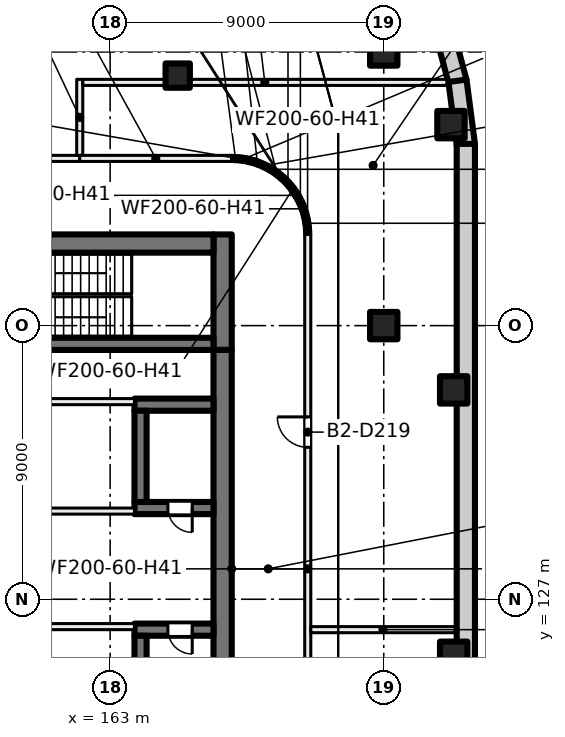
"""IFC4 building model, lengths in metres.
Left out: names, types, materials, properties, quantities, classifications, styles, units other than length and angle.
Written with IfcOpenShell. Run it as: python <this file> out.ifc"""

import sys

from ifc_helpers import new_model, si_unit, direction, frame, frame_2d, origin, origin_2d, place, context, subcontext, project, spatial, rectangle, extrude, element, fill, save


model = new_model("IFC4")
c1 = context("Model", 3, precision=1e-05, world=origin(), true_north=direction((0.0, 1.0)))
c2 = subcontext(c1, "Body", "Model", "MODEL_VIEW")
j1 = project(units=[si_unit("LENGTHUNIT", "METRE"), si_unit("PLANEANGLEUNIT", "RADIAN")], contexts=[c1])
p1 = place(None, origin())
s1 = spatial("IfcSite", under=j1, at=p1, CompositionType="ELEMENT")
p2 = place(p1, origin())
s2 = spatial("IfcBuilding", under=s1, at=p2, CompositionType="ELEMENT")
p3 = place(p2, frame((0.0, 0.0, -9.0)))
s3 = spatial("IfcBuildingStorey", under=s2, at=p3, CompositionType="ELEMENT", Elevation=-9.0)
p4 = place(p3, frame((173.908, 145.968, 0.0), z_axis=(0.0, 0.0, 1.0), x_axis=(0.258804467146, -0.965929732323, 0.0)))
e1 = element("IfcWall", 1, at=p4, inside=s3, PredefinedType="SHEAR", context=c2, shape_type="SweptSolid", body=[
    extrude(rectangle(XDim=2.022, YDim=0.6, at=frame_2d((1.011, 0.0))), origin(), (0.0, 0.0, 1.0), 4.5),
])
p5 = place(p3, frame((174.424, 144.052, 0.0), z_axis=(0.0, 0.0, 1.0), x_axis=(0.130558200013, -0.991440646942, 0.0)))
e2 = element("IfcWall", 2, at=p5, inside=s3, PredefinedType="SHEAR", context=c2, shape_type="SweptSolid", body=[
    extrude(rectangle(XDim=2.132, YDim=0.6, at=frame_2d((1.066, 0.0))), origin(), (0.0, 0.0, 1.0), 4.5),
])
p6 = place(p3, frame((174.7, 141.978, 0.0), z_axis=(0.0, 0.0, 1.0), x_axis=(0.0, -1.0, 0.0)))
e3 = element("IfcWall", 3, at=p6, inside=s3, PredefinedType="SHEAR", context=c2, shape_type="SweptSolid", body=[
    extrude(rectangle(XDim=27.957, YDim=0.6, at=frame_2d((13.978, 0.0))), origin(), (0.0, 0.0, 1.0), 4.5),
])
for number, where, z_axis, x_axis in (
    (4, (172.0, 136.0, 0.0), (0.0, 0.0, 1.0), (1.0, 0.0, 0.0)),
    (5, (172.0, 145.0, 0.0), (0.0, 0.0, 1.0), (1.0, 0.0, 0.0)),
    (6, (174.211, 142.611, 0.0), (0.0, 0.0, 1.0), (1.0, 0.0, 0.0)),
    (7, (174.3, 133.887, 0.0), (0.0, 0.0, 1.0), (1.0, 0.0, 0.0)),
    (8, (174.3, 125.157, 0.0), (0.0, 0.0, 1.0), (1.0, 0.0, 0.0)),
):
    element("IfcColumn", number, at=place(p3, frame(where, z_axis=z_axis, x_axis=x_axis)), inside=s3, PredefinedType="COLUMN", context=c2, shape_type="SweptSolid", body=[
        extrude(rectangle(XDim=0.9, YDim=0.9, at=origin_2d()), origin(), (0.0, 0.0, 1.0), 4.5),
    ])
p7 = place(p3, frame((165.223, 144.223, 0.0), z_axis=(0.0, 0.0, 1.0), x_axis=(1.0, 0.0, 0.0)))
e9 = element("IfcColumn", 9, at=p7, inside=s3, PredefinedType="COLUMN", context=c2, shape_type="SweptSolid", body=[
    extrude(rectangle(XDim=0.8, YDim=0.8, at=origin_2d()), origin(), (0.0, 0.0, 1.0), 4.5),
])
p8 = place(p3, frame((166.7, 139.0, 0.0), z_axis=(0.0, 0.0, 1.0), x_axis=(0.0, -1.0, 0.0)))
e10 = element("IfcWall", 10, at=p8, inside=s3, PredefinedType="SHEAR", context=c2, shape_type="SweptSolid", body=[
    extrude(rectangle(XDim=3.8, YDim=0.6, at=frame_2d((1.9, 0.0))), origin(), (0.0, 0.0, 1.0), 4.5),
])
p9 = place(p3, frame((166.7, 135.2, 0.0), z_axis=(0.0, 0.0, 1.0), x_axis=(0.0, -1.0, 0.0)))
e11 = element("IfcWall", 11, at=p9, inside=s3, PredefinedType="SHEAR", context=c2, shape_type="SweptSolid", body=[
    extrude(rectangle(XDim=14.4, YDim=0.6, at=frame_2d((7.2, 0.0))), origin(), (0.0, 0.0, 1.0), 4.5),
])
p10 = place(p3, frame((166.4, 138.7, 0.0), z_axis=(0.0, 0.0, 1.0), x_axis=(-1.0, 0.0, 0.0)))
e12 = element("IfcWall", 12, at=p10, inside=s3, PredefinedType="SHEAR", context=c2, shape_type="SweptSolid", body=[
    extrude(rectangle(XDim=7.8, YDim=0.6, at=frame_2d((3.9, 0.0))), origin(), (0.0, 0.0, 1.0), 4.5),
])
p11 = place(p3, frame((166.4, 135.4, 0.0), z_axis=(0.0, 0.0, 1.0), x_axis=(-1.0, 0.0, 0.0)))
e13 = element("IfcWall", 13, at=p11, inside=s3, PredefinedType="SHEAR", context=c2, shape_type="SweptSolid", body=[
    extrude(rectangle(XDim=7.8, YDim=0.4, at=frame_2d((3.9, 0.0))), origin(), (0.0, 0.0, 1.0), 4.5),
])
p12 = place(p3, frame((166.4, 130.0, 0.0), z_axis=(0.0, 0.0, 1.0), x_axis=(-1.0, 0.0, 0.0)))
e14 = element("IfcWall", 14, at=p12, inside=s3, PredefinedType="SHEAR", context=c2, shape_type="SweptSolid", body=[
    extrude(rectangle(XDim=2.6, YDim=0.4, at=frame_2d((1.3, 0.0))), origin(), (0.0, 0.0, 1.0), 4.5),
])
p13 = place(p12, frame((0.7, 0.0, 0.0)))
e15 = element("IfcOpeningElement", 15, at=p13, cuts=e14, PredefinedType="OPENING", context=c2, shape_type="SweptSolid", body=[
    extrude(rectangle(XDim=0.8, YDim=2.1, at=frame_2d((0.4, 1.05))), frame((0.0, 0.21, 0.0), z_axis=(0.0, -1.0, 0.0), x_axis=(1.0, 0.0, 0.0)), (0.0, 0.0, 1.0), 0.42),
])
p14 = place(p3, frame((166.4, 133.4, 0.0), z_axis=(0.0, 0.0, 1.0), x_axis=(-1.0, 0.0, 0.0)))
e16 = element("IfcWall", 16, at=p14, inside=s3, PredefinedType="SHEAR", context=c2, shape_type="SweptSolid", body=[
    extrude(rectangle(XDim=2.6, YDim=0.4, at=frame_2d((1.3, 0.0))), origin(), (0.0, 0.0, 1.0), 4.5),
])
p15 = place(p3, frame((164.0, 133.2, 0.0), z_axis=(0.0, 0.0, 1.0), x_axis=(0.0, -1.0, 0.0)))
e17 = element("IfcWall", 17, at=p15, inside=s3, PredefinedType="SHEAR", context=c2, shape_type="SweptSolid", body=[
    extrude(rectangle(XDim=3.0, YDim=0.4, at=frame_2d((1.5, 0.0))), origin(), (0.0, 0.0, 1.0), 4.5),
])
p16 = place(p3, frame((166.4, 126.0, 0.0), z_axis=(0.0, 0.0, 1.0), x_axis=(-1.0, 0.0, 0.0)))
e18 = element("IfcWall", 18, at=p16, inside=s3, PredefinedType="SHEAR", context=c2, shape_type="SweptSolid", body=[
    extrude(rectangle(XDim=2.6, YDim=0.4, at=frame_2d((1.3, 0.0))), origin(), (0.0, 0.0, 1.0), 4.5),
])
p17 = place(p16, frame((0.7, 0.0, 0.0)))
e19 = element("IfcOpeningElement", 19, at=p17, cuts=e18, PredefinedType="OPENING", context=c2, shape_type="SweptSolid", body=[
    extrude(rectangle(XDim=0.8, YDim=2.1, at=frame_2d((0.4, 1.05))), frame((0.0, 0.21, 0.0), z_axis=(0.0, -1.0, 0.0), x_axis=(1.0, 0.0, 0.0)), (0.0, 0.0, 1.0), 0.42),
])
p18 = place(p3, frame((164.0, 125.8, 0.0), z_axis=(0.0, 0.0, 1.0), x_axis=(0.0, -1.0, 0.0)))
e20 = element("IfcWall", 20, at=p18, inside=s3, PredefinedType="SHEAR", context=c2, shape_type="SweptSolid", body=[
    extrude(rectangle(XDim=3.0, YDim=0.4, at=frame_2d((1.5, 0.0))), origin(), (0.0, 0.0, 1.0), 4.5),
])
p19 = place(p3, frame((163.8, 126.1, 0.0), z_axis=(0.0, 0.0, 1.0), x_axis=(-1.0, 0.0, 0.0)))
e21 = element("IfcWall", 21, at=p19, inside=s3, PredefinedType="PARTITIONING", context=c2, shape_type="SweptSolid", body=[
    extrude(rectangle(XDim=9.4, YDim=0.2, at=frame_2d((4.7, 0.0))), origin(), (0.0, 0.0, 1.0), 4.125),
])
p20 = place(p19, frame((4.1, 0.0, 0.0)))
e22 = element("IfcOpeningElement", 22, at=p20, cuts=e21, PredefinedType="OPENING", context=c2, shape_type="SweptSolid", body=[
    extrude(rectangle(XDim=1.2, YDim=2.1, at=frame_2d((0.6, 1.05))), frame((0.0, 0.11, 0.0), z_axis=(0.0, -1.0, 0.0), x_axis=(1.0, 0.0, 0.0)), (0.0, 0.0, 1.0), 0.22),
])
p21 = place(p3, frame((154.4, 129.9, 0.0), z_axis=(0.0, 0.0, 1.0), x_axis=(1.0, 0.0, 0.0)))
e23 = element("IfcWall", 23, at=p21, inside=s3, PredefinedType="PARTITIONING", context=c2, shape_type="SweptSolid", body=[
    extrude(rectangle(XDim=9.4, YDim=0.2, at=frame_2d((4.7, 0.0))), origin(), (0.0, 0.0, 1.0), 4.125),
])
p22 = place(p21, frame((4.1, 0.0, 0.0)))
e24 = element("IfcOpeningElement", 24, at=p22, cuts=e23, PredefinedType="OPENING", context=c2, shape_type="SweptSolid", body=[
    extrude(rectangle(XDim=1.2, YDim=2.1, at=frame_2d((0.6, 1.05))), frame((0.0, 0.11, 0.0), z_axis=(0.0, -1.0, 0.0), x_axis=(1.0, 0.0, 0.0)), (0.0, 0.0, 1.0), 0.22),
])
p23 = place(p3, frame((154.4, 133.5, 0.0), z_axis=(0.0, 0.0, 1.0), x_axis=(1.0, 0.0, 0.0)))
e25 = element("IfcWall", 25, at=p23, inside=s3, PredefinedType="PARTITIONING", context=c2, shape_type="SweptSolid", body=[
    extrude(rectangle(XDim=9.4, YDim=0.2, at=frame_2d((4.7, 0.0))), origin(), (0.0, 0.0, 1.0), 4.125),
])
p24 = place(p23, frame((1.35, 0.0, 0.0)))
e26 = element("IfcOpeningElement", 26, at=p24, cuts=e25, PredefinedType="OPENING", context=c2, shape_type="SweptSolid", body=[
    extrude(rectangle(XDim=1.5, YDim=2.1, at=frame_2d((0.75, 1.05))), frame((0.0, 0.11, 0.0), z_axis=(0.0, -1.0, 0.0), x_axis=(1.0, 0.0, 0.0)), (0.0, 0.0, 1.0), 0.22),
])
p25 = place(p3, frame((154.1, 141.5, 0.0), z_axis=(0.0, 0.0, 1.0), x_axis=(1.0, 0.0, 0.0)))
e27 = element("IfcWall", 27, at=p25, inside=s3, PredefinedType="PARTITIONING", context=c2, shape_type="SweptSolid", body=[
    extrude(rectangle(XDim=7.9, YDim=0.2, at=frame_2d((3.95, 0.0))), origin(), (0.0, 0.0, 1.0), 4.125),
])
p26 = place(p3, frame((162.0, 141.6, 0.0), z_axis=(0.0, 0.0, 1.0), x_axis=(0.0, 1.0, 0.0)))
e28 = element("IfcWall", 28, at=p26, inside=s3, PredefinedType="PARTITIONING", context=c2, shape_type="SweptSolid", body=[
    extrude(rectangle(XDim=2.5, YDim=0.2, at=frame_2d((1.25, 0.0))), origin(), (0.0, 0.0, 1.0), 4.125),
])
p27 = place(p3, frame((162.0, 141.5, 0.0), z_axis=(0.0, 0.0, 1.0), x_axis=(1.0, 0.0, 0.0)))
e29 = element("IfcWall", 29, at=p27, inside=s3, PredefinedType="PARTITIONING", context=c2, shape_type="SweptSolid", body=[
    extrude(rectangle(XDim=5.002, YDim=0.2, at=frame_2d((2.501, 0.0))), origin(), (0.0, 0.0, 1.0), 4.125),
])
p28 = place(p3, frame((162.1, 144.0, 0.0), z_axis=(0.0, 0.0, 1.0), x_axis=(1.0, 0.0, 0.0)))
e30 = element("IfcWall", 30, at=p28, inside=s3, PredefinedType="PARTITIONING", context=c2, shape_type="SweptSolid", body=[
    extrude(rectangle(XDim=11.974, YDim=0.2, at=frame_2d((5.987, 0.0))), origin(), (0.0, 0.0, 1.0), 4.125),
])
p29 = place(p3, frame((166.998, 141.5, 0.0), z_axis=(0.0, 0.0, 1.0), x_axis=(0.998874697667, -0.047427190102, 0.0)))
e31 = element("IfcWall", 31, at=p29, inside=s3, PredefinedType="PARTITIONING", context=c2, shape_type="SweptSolid", body=[
    extrude(rectangle(XDim=0.252, YDim=0.2, at=frame_2d((0.126, 0.0))), origin(), (0.0, 0.0, 1.0), 4.125),
])
p30 = place(p3, frame((167.24, 141.489, 0.0), z_axis=(0.0, 0.0, 1.0), x_axis=(0.988852180426, -0.148900521377, 0.0)))
e32 = element("IfcWall", 32, at=p30, inside=s3, PredefinedType="PARTITIONING", context=c2, shape_type="SweptSolid", body=[
    extrude(rectangle(XDim=0.256, YDim=0.2, at=frame_2d((0.128, 0.0))), origin(), (0.0, 0.0, 1.0), 4.125),
])
p31 = place(p3, frame((167.483, 141.453, 0.0), z_axis=(0.0, 0.0, 1.0), x_axis=(0.970366809683, -0.241636616978, 0.0)))
e33 = element("IfcWall", 33, at=p31, inside=s3, PredefinedType="PARTITIONING", context=c2, shape_type="SweptSolid", body=[
    extrude(rectangle(XDim=0.256, YDim=0.2, at=frame_2d((0.128, 0.0))), origin(), (0.0, 0.0, 1.0), 4.125),
])
p32 = place(p3, frame((167.722, 141.394, 0.0), z_axis=(0.0, 0.0, 1.0), x_axis=(0.941459892631, -0.337125007331, 0.0)))
e34 = element("IfcWall", 34, at=p32, inside=s3, PredefinedType="PARTITIONING", context=c2, shape_type="SweptSolid", body=[
    extrude(rectangle(XDim=0.255, YDim=0.2, at=frame_2d((0.127, 0.0))), origin(), (0.0, 0.0, 1.0), 4.125),
])
p33 = place(p3, frame((167.952, 141.312, 0.0), z_axis=(0.0, 0.0, 1.0), x_axis=(0.903444698448, -0.4287046499, 0.0)))
e35 = element("IfcWall", 35, at=p33, inside=s3, PredefinedType="PARTITIONING", context=c2, shape_type="SweptSolid", body=[
    extrude(rectangle(XDim=0.255, YDim=0.2, at=frame_2d((0.127, 0.0))), origin(), (0.0, 0.0, 1.0), 4.125),
])
p34 = place(p3, frame((168.174, 141.207, 0.0), z_axis=(0.0, 0.0, 1.0), x_axis=(0.857998903579, -0.513651517527, 0.0)))
e36 = element("IfcWall", 36, at=p34, inside=s3, PredefinedType="PARTITIONING", context=c2, shape_type="SweptSolid", body=[
    extrude(rectangle(XDim=0.255, YDim=0.2, at=frame_2d((0.127, 0.0))), origin(), (0.0, 0.0, 1.0), 4.125),
])
p35 = place(p3, frame((168.385, 141.082, 0.0), z_axis=(0.0, 0.0, 1.0), x_axis=(0.803201336243, -0.595707657713, 0.0)))
e37 = element("IfcWall", 37, at=p35, inside=s3, PredefinedType="PARTITIONING", context=c2, shape_type="SweptSolid", body=[
    extrude(rectangle(XDim=0.255, YDim=0.2, at=frame_2d((0.128, 0.0))), origin(), (0.0, 0.0, 1.0), 4.125),
])
for number, where, z_axis, x_axis in (
    (38, (168.582, 140.936, 0.0), (0.0, 0.0, 1.0), (0.743, -0.669, 0.0)),
    (39, (168.765, 140.772, 0.0), (0.0, 0.0, 1.0), (0.669, -0.743, 0.0)),
):
    element("IfcWall", number, at=place(p3, frame(where, z_axis=z_axis, x_axis=x_axis)), inside=s3, PredefinedType="PARTITIONING", context=c2, shape_type="SweptSolid", body=[
        extrude(rectangle(XDim=0.256, YDim=0.2, at=frame_2d((0.128, 0.0))), origin(), (0.0, 0.0, 1.0), 4.125),
    ])
p36 = place(p3, frame((168.93, 140.59, 0.0), z_axis=(0.0, 0.0, 1.0), x_axis=(0.595707657713, -0.803201336243, 0.0)))
e40 = element("IfcWall", 40, at=p36, inside=s3, PredefinedType="PARTITIONING", context=c2, shape_type="SweptSolid", body=[
    extrude(rectangle(XDim=0.255, YDim=0.2, at=frame_2d((0.128, 0.0))), origin(), (0.0, 0.0, 1.0), 4.125),
])
p37 = place(p3, frame((169.076, 140.393, 0.0), z_axis=(0.0, 0.0, 1.0), x_axis=(0.513651517527, -0.857998903579, 0.0)))
e41 = element("IfcWall", 41, at=p37, inside=s3, PredefinedType="PARTITIONING", context=c2, shape_type="SweptSolid", body=[
    extrude(rectangle(XDim=0.255, YDim=0.2, at=frame_2d((0.127, 0.0))), origin(), (0.0, 0.0, 1.0), 4.125),
])
p38 = place(p3, frame((169.203, 140.182, 0.0), z_axis=(0.0, 0.0, 1.0), x_axis=(0.4287046499, -0.903444698448, 0.0)))
e42 = element("IfcWall", 42, at=p38, inside=s3, PredefinedType="PARTITIONING", context=c2, shape_type="SweptSolid", body=[
    extrude(rectangle(XDim=0.255, YDim=0.2, at=frame_2d((0.127, 0.0))), origin(), (0.0, 0.0, 1.0), 4.125),
])
p39 = place(p3, frame((169.308, 139.962, 0.0), z_axis=(0.0, 0.0, 1.0), x_axis=(0.337125007331, -0.941459892631, 0.0)))
e43 = element("IfcWall", 43, at=p39, inside=s3, PredefinedType="PARTITIONING", context=c2, shape_type="SweptSolid", body=[
    extrude(rectangle(XDim=0.255, YDim=0.2, at=frame_2d((0.127, 0.0))), origin(), (0.0, 0.0, 1.0), 4.125),
])
p40 = place(p3, frame((169.391, 139.731, 0.0), z_axis=(0.0, 0.0, 1.0), x_axis=(0.241636616978, -0.970366809683, 0.0)))
e44 = element("IfcWall", 44, at=p40, inside=s3, PredefinedType="PARTITIONING", context=c2, shape_type="SweptSolid", body=[
    extrude(rectangle(XDim=0.256, YDim=0.2, at=frame_2d((0.128, 0.0))), origin(), (0.0, 0.0, 1.0), 4.125),
])
p41 = place(p3, frame((169.451, 139.493, 0.0), z_axis=(0.0, 0.0, 1.0), x_axis=(0.148900521377, -0.988852180426, 0.0)))
e45 = element("IfcWall", 45, at=p41, inside=s3, PredefinedType="PARTITIONING", context=c2, shape_type="SweptSolid", body=[
    extrude(rectangle(XDim=0.256, YDim=0.2, at=frame_2d((0.128, 0.0))), origin(), (0.0, 0.0, 1.0), 4.125),
])
p42 = place(p3, frame((169.488, 139.25, 0.0), z_axis=(0.0, 0.0, 1.0), x_axis=(0.047427190102, -0.998874697667, 0.0)))
e46 = element("IfcWall", 46, at=p42, inside=s3, PredefinedType="PARTITIONING", context=c2, shape_type="SweptSolid", body=[
    extrude(rectangle(XDim=0.252, YDim=0.2, at=frame_2d((0.126, 0.0))), origin(), (0.0, 0.0, 1.0), 4.125),
])
p43 = place(p3, frame((169.5, 139.002, 0.0), z_axis=(0.0, 0.0, 1.0), x_axis=(0.0, -1.0, 0.0)))
e47 = element("IfcWall", 47, at=p43, inside=s3, PredefinedType="PARTITIONING", context=c2, shape_type="SweptSolid", body=[
    extrude(rectangle(XDim=22.004, YDim=0.2, at=frame_2d((11.002, 0.0))), origin(), (0.0, 0.0, 1.0), 4.125),
])
p44 = place(p43, frame((17.0, 0.0, 0.0)))
e48 = element("IfcOpeningElement", 48, at=p44, cuts=e47, PredefinedType="OPENING", context=c2, shape_type="SweptSolid", body=[
    extrude(rectangle(XDim=1.0, YDim=2.1, at=frame_2d((0.5, 1.05))), frame((0.0, 0.11, 0.0), z_axis=(0.0, -1.0, 0.0), x_axis=(1.0, 0.0, 0.0)), (0.0, 0.0, 1.0), 0.22),
])
p45 = place(p43, frame((6.004, 0.0, 0.0)))
e49 = element("IfcOpeningElement", 49, at=p45, cuts=e47, PredefinedType="OPENING", context=c2, shape_type="SweptSolid", body=[
    extrude(rectangle(XDim=1.0, YDim=2.1, at=frame_2d((0.5, 1.05))), frame((0.0, 0.11, 0.0), z_axis=(0.0, -1.0, 0.0), x_axis=(1.0, 0.0, 0.0)), (0.0, 0.0, 1.0), 0.22),
])
p46 = place(p3, frame((169.6, 126.0, 0.0), z_axis=(0.0, 0.0, 1.0), x_axis=(1.0, 0.0, 0.0)))
e50 = element("IfcWall", 50, at=p46, inside=s3, PredefinedType="PARTITIONING", context=c2, shape_type="SweptSolid", body=[
    extrude(rectangle(XDim=4.75, YDim=0.2, at=frame_2d((2.375, 0.0))), origin(), (0.0, 0.0, 1.0), 4.125),
])
p47 = place(p17, origin())
e51 = element("IfcDoor", 51, at=p47, inside=s3, OperationType="SINGLE_SWING_LEFT", PredefinedType="DOOR", context=c2, shape_type="SweptSolid", body=[
    extrude(rectangle(XDim=0.8, YDim=2.1, at=frame_2d((0.4, 1.05))), frame((0.0, 0.025, 0.0), z_axis=(0.0, -1.0, 0.0), x_axis=(1.0, 0.0, 0.0)), (0.0, 0.0, 1.0), 0.05),
])
fill(e19, e51)
p48 = place(p13, origin())
e52 = element("IfcDoor", 52, at=p48, inside=s3, OperationType="SINGLE_SWING_RIGHT", PredefinedType="DOOR", context=c2, shape_type="SweptSolid", body=[
    extrude(rectangle(XDim=0.8, YDim=2.1, at=frame_2d((0.4, 1.05))), frame((0.0, 0.025, 0.0), z_axis=(0.0, -1.0, 0.0), x_axis=(1.0, 0.0, 0.0)), (0.0, 0.0, 1.0), 0.05),
])
fill(e15, e52)
p49 = place(p45, origin())
e53 = element("IfcDoor", 53, at=p49, inside=s3, OperationType="SINGLE_SWING_LEFT", PredefinedType="DOOR", context=c2, shape_type="SweptSolid", body=[
    extrude(rectangle(XDim=1.0, YDim=2.1, at=frame_2d((0.5, 1.05))), frame((0.0, 0.025, 0.0), z_axis=(0.0, -1.0, 0.0), x_axis=(1.0, 0.0, 0.0)), (0.0, 0.0, 1.0), 0.05),
])
fill(e49, e53)
save(model, sys.argv[1])
